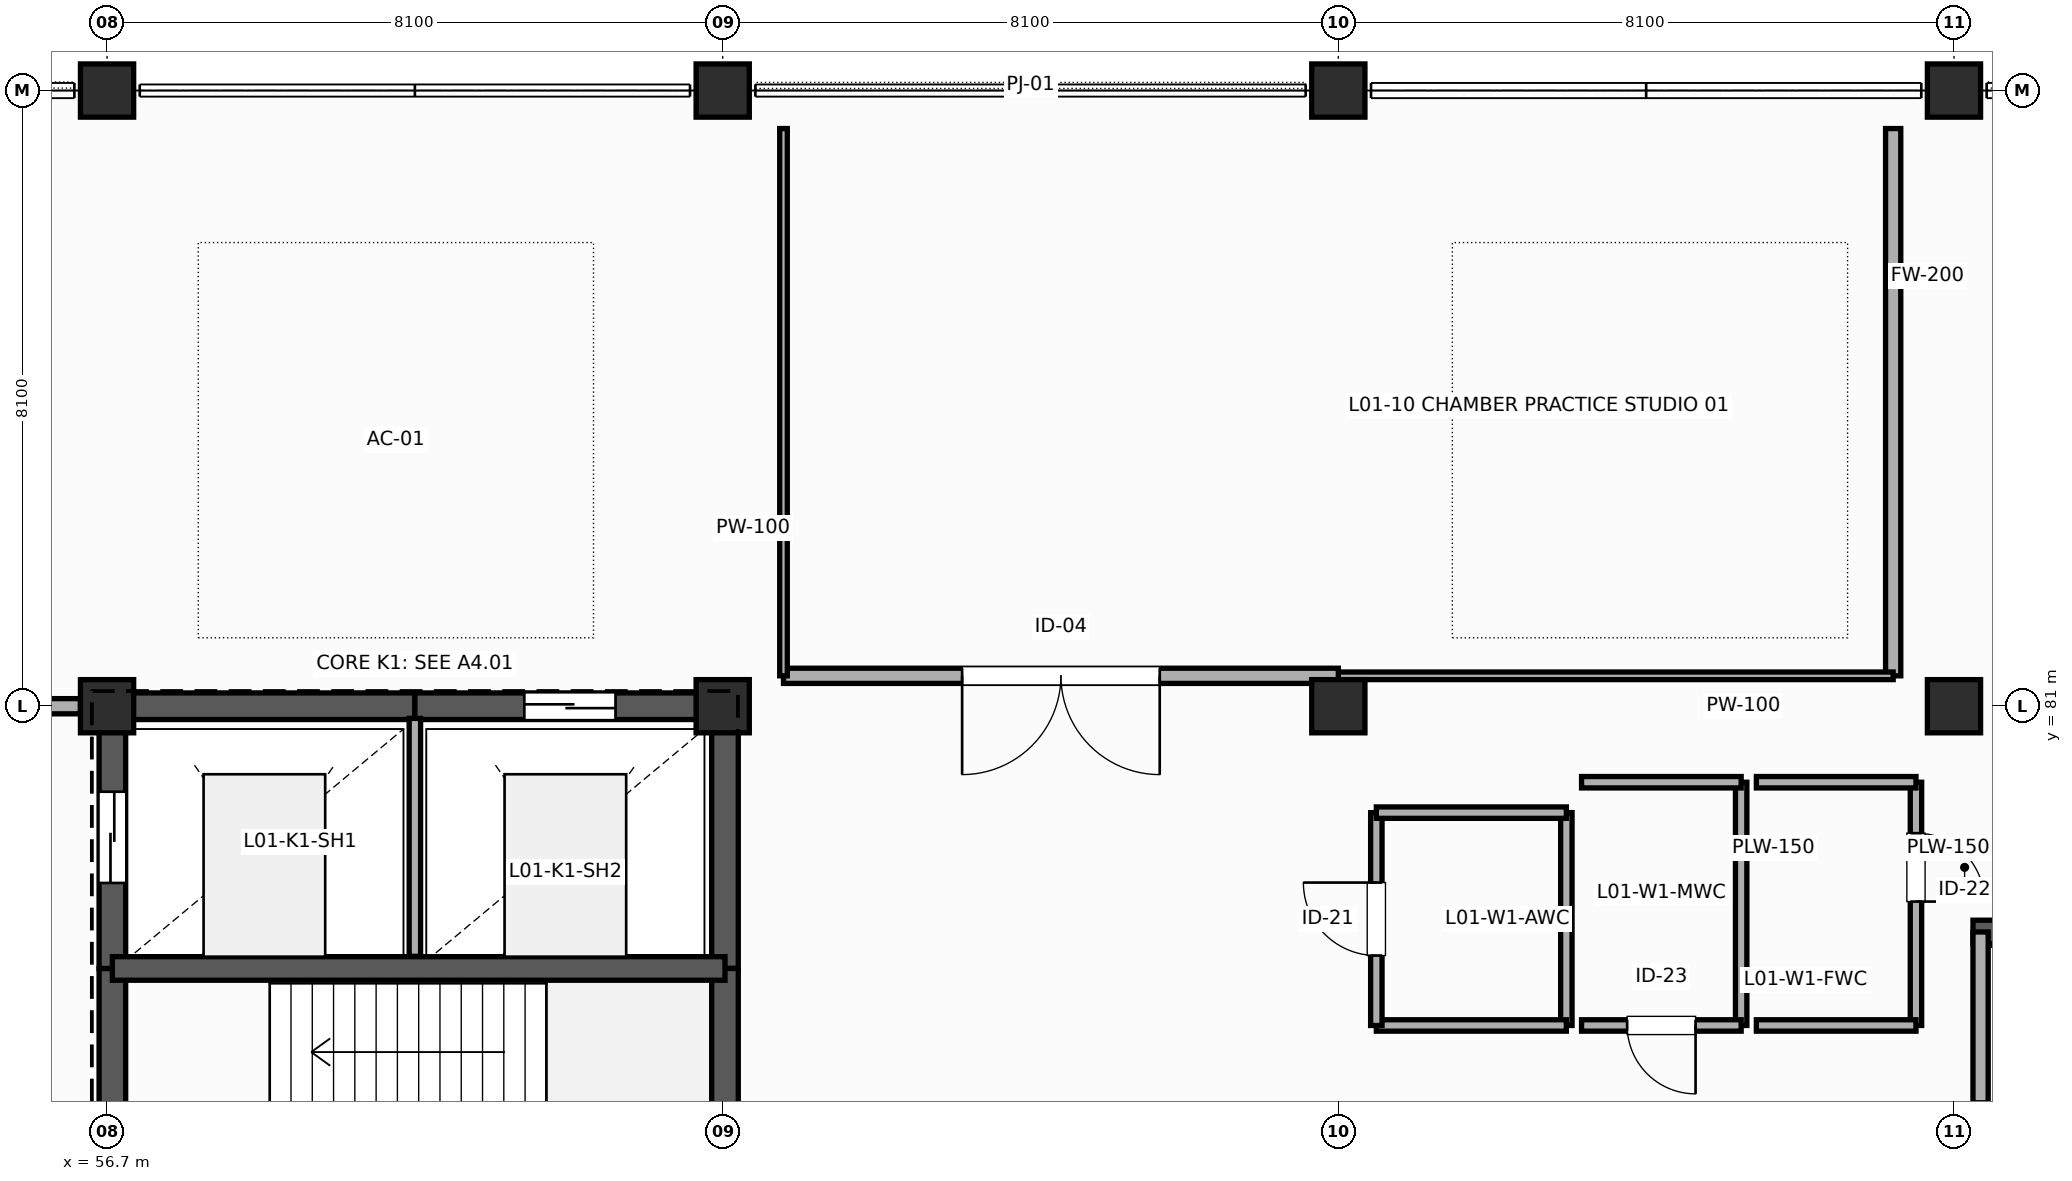
"""IFC4 building model, lengths in metres.
Left out: names, types, materials, properties, quantities, classifications, styles, units other than length and angle.
Written with IfcOpenShell. Run it as: python <this file> out.ifc"""

import sys

from ifc_helpers import new_model, si_unit, direction, frame, frame_2d, origin, origin_2d, place, context, subcontext, project, spatial, rectangle, extrude, element, fill, save


model = new_model("IFC4")
c1 = context("Model", 3, precision=1e-05, world=origin(), true_north=direction((0.0, 1.0)))
c2 = subcontext(c1, "Body", "Model", "MODEL_VIEW")
j1 = project(units=[si_unit("LENGTHUNIT", "METRE"), si_unit("PLANEANGLEUNIT", "RADIAN")], contexts=[c1])
p1 = place(None, origin())
s1 = spatial("IfcSite", under=j1, at=p1, CompositionType="ELEMENT")
p2 = place(p1, origin())
s2 = spatial("IfcBuilding", under=s1, at=p2, CompositionType="ELEMENT")
p3 = place(p2, frame((0.0, 0.0, 5.4)))
s3 = spatial("IfcBuildingStorey", under=s2, at=p3, CompositionType="ELEMENT", Elevation=5.4)
for number, where, z_axis, x_axis in (
    (1, (56.7, 81.0, 0.0), (0.0, 0.0, 1.0), (1.0, 0.0, 0.0)),
    (2, (56.7, 89.1, 0.0), (0.0, 0.0, 1.0), (1.0, 0.0, 0.0)),
    (3, (64.8, 81.0, 0.0), (0.0, 0.0, 1.0), (1.0, 0.0, 0.0)),
    (4, (64.8, 89.1, 0.0), (0.0, 0.0, 1.0), (1.0, 0.0, 0.0)),
    (5, (72.9, 81.0, 0.0), (0.0, 0.0, 1.0), (1.0, 0.0, 0.0)),
    (6, (72.9, 89.1, 0.0), (0.0, 0.0, 1.0), (1.0, 0.0, 0.0)),
    (7, (81.0, 81.0, 0.0), (0.0, 0.0, 1.0), (1.0, 0.0, 0.0)),
    (8, (81.0, 89.1, 0.0), (0.0, 0.0, 1.0), (1.0, 0.0, 0.0)),
):
    element("IfcColumn", number, at=place(p3, frame(where, z_axis=z_axis, x_axis=x_axis)), inside=s3, PredefinedType="COLUMN", context=c2, shape_type="SweptSolid", body=[
        extrude(rectangle(XDim=0.7, YDim=0.7, at=origin_2d()), origin(), (0.0, 0.0, 1.0), 4.8),
    ])
p4 = place(p3, frame((56.77, 73.13, 0.0), z_axis=(0.0, 0.0, 1.0), x_axis=(0.0, 1.0, 0.0)))
e9 = element("IfcWall", 9, at=p4, inside=s3, PredefinedType="SHEAR", context=c2, shape_type="SweptSolid", body=[
    extrude(rectangle(XDim=4.42, YDim=0.35, at=frame_2d((2.21, 0.0))), origin(), (0.0, 0.0, 1.0), 4.8),
])
p5 = place(p4, frame((1.35, 0.0, 0.0)))
e10 = element("IfcOpeningElement", 10, at=p5, cuts=e9, PredefinedType="OPENING", context=c2, shape_type="SweptSolid", body=[
    extrude(rectangle(XDim=1.2, YDim=2.25, at=frame_2d((0.6, 1.125))), frame((0.0, 0.185, 0.0), z_axis=(0.0, -1.0, 0.0), x_axis=(1.0, 0.0, 0.0)), (0.0, 0.0, 1.0), 0.37),
])
p6 = place(p3, frame((56.77, 77.55, 0.0), z_axis=(0.0, 0.0, 1.0), x_axis=(0.0, 1.0, 0.0)))
e11 = element("IfcWall", 11, at=p6, inside=s3, PredefinedType="SHEAR", context=c2, shape_type="SweptSolid", body=[
    extrude(rectangle(XDim=3.45, YDim=0.35, at=frame_2d((1.725, 0.0))), origin(), (0.0, 0.0, 1.0), 4.8),
])
p7 = place(p6, frame((1.125, 0.0, 0.0)))
e12 = element("IfcOpeningElement", 12, at=p7, cuts=e11, PredefinedType="OPENING", context=c2, shape_type="SweptSolid", body=[
    extrude(rectangle(XDim=1.2, YDim=2.2, at=frame_2d((0.6, 1.1))), frame((0.0, 0.185, 0.0), z_axis=(0.0, -1.0, 0.0), x_axis=(1.0, 0.0, 0.0)), (0.0, 0.0, 1.0), 0.37),
])
p8 = place(p3, frame((56.77, 81.0, 0.0), z_axis=(0.0, 0.0, 1.0), x_axis=(1.0, 0.0, 0.0)))
e13 = element("IfcWall", 13, at=p8, inside=s3, PredefinedType="SHEAR", context=c2, shape_type="SweptSolid", body=[
    extrude(rectangle(XDim=3.98, YDim=0.35, at=frame_2d((1.99, 0.0))), origin(), (0.0, 0.0, 1.0), 4.8),
])
p9 = place(p3, frame((60.75, 81.0, 0.0), z_axis=(0.0, 0.0, 1.0), x_axis=(1.0, 0.0, 0.0)))
e14 = element("IfcWall", 14, at=p9, inside=s3, PredefinedType="SHEAR", context=c2, shape_type="SweptSolid", body=[
    extrude(rectangle(XDim=4.08, YDim=0.35, at=frame_2d((2.04, 0.0))), origin(), (0.0, 0.0, 1.0), 4.8),
])
p10 = place(p9, frame((1.44, 0.0, 0.0)))
e15 = element("IfcOpeningElement", 15, at=p10, cuts=e14, PredefinedType="OPENING", context=c2, shape_type="SweptSolid", body=[
    extrude(rectangle(XDim=1.2, YDim=2.2, at=frame_2d((0.6, 1.1))), frame((0.0, 0.185, 0.0), z_axis=(0.0, -1.0, 0.0), x_axis=(1.0, 0.0, 0.0)), (0.0, 0.0, 1.0), 0.37),
])
p11 = place(p3, frame((64.83, 81.0, 0.0), z_axis=(0.0, 0.0, 1.0), x_axis=(0.0, -1.0, 0.0)))
e16 = element("IfcWall", 16, at=p11, inside=s3, PredefinedType="SHEAR", context=c2, shape_type="SweptSolid", body=[
    extrude(rectangle(XDim=3.45, YDim=0.35, at=frame_2d((1.725, 0.0))), origin(), (0.0, 0.0, 1.0), 4.8),
])
p12 = place(p3, frame((64.83, 77.55, 0.0), z_axis=(0.0, 0.0, 1.0), x_axis=(0.0, -1.0, 0.0)))
e17 = element("IfcWall", 17, at=p12, inside=s3, PredefinedType="SHEAR", context=c2, shape_type="SweptSolid", body=[
    extrude(rectangle(XDim=4.42, YDim=0.35, at=frame_2d((2.21, 0.0))), origin(), (0.0, 0.0, 1.0), 4.8),
])
p13 = place(p3, frame((56.77, 77.55, 0.0), z_axis=(0.0, 0.0, 1.0), x_axis=(1.0, 0.0, 0.0)))
e18 = element("IfcWall", 18, at=p13, inside=s3, PredefinedType="SHEAR", context=c2, shape_type="SweptSolid", body=[
    extrude(rectangle(XDim=8.06, YDim=0.31, at=frame_2d((4.03, 0.0))), origin(), (0.0, 0.0, 1.0), 4.8),
])
p14 = place(p3, frame((60.75, 77.71, 0.0), z_axis=(0.0, 0.0, 1.0), x_axis=(0.0, 1.0, 0.0)))
e19 = element("IfcWall", 19, at=p14, inside=s3, PredefinedType="PLUMBINGWALL", context=c2, shape_type="SweptSolid", body=[
    extrude(rectangle(XDim=3.13, YDim=0.15, at=frame_2d((1.565, 0.0))), origin(), (0.0, 0.0, 1.0), 4.45),
])
p15 = place(p3, frame((51.3, 81.0, 0.0), z_axis=(0.0, 0.0, 1.0), x_axis=(1.0, 0.0, 0.0)))
e20 = element("IfcWall", 20, at=p15, inside=s3, PredefinedType="PARTITIONING", context=c2, shape_type="SweptSolid", body=[
    extrude(rectangle(XDim=5.05, YDim=0.2, at=frame_2d((2.525, 0.0))), origin(), (0.0, 0.0, 1.0), 4.021),
])
p16 = place(p3, frame((89.795, 78.03, 0.0), z_axis=(0.0, 0.0, 1.0), x_axis=(-1.0, 0.0, 0.0)))
e21 = element("IfcWall", 21, at=p16, inside=s3, PredefinedType="SHEAR", context=c2, shape_type="SweptSolid", body=[
    extrude(rectangle(XDim=8.545, YDim=0.31, at=frame_2d((4.272, 0.0))), origin(), (0.0, 0.0, 1.0), 4.8),
])
p17 = place(p3, frame((81.35, 73.35, 0.0), z_axis=(0.0, 0.0, 1.0), x_axis=(0.0, 1.0, 0.0)))
e22 = element("IfcWall", 22, at=p17, inside=s3, PredefinedType="PARTITIONING", context=c2, shape_type="SweptSolid", body=[
    extrude(rectangle(XDim=4.68, YDim=0.2, at=frame_2d((2.34, 0.0))), origin(), (0.0, 0.0, 1.0), 4.45),
])
p18 = place(p17, frame((1.25, 0.0, 0.0)))
e23 = element("IfcOpeningElement", 23, at=p18, cuts=e22, PredefinedType="OPENING", context=c2, shape_type="SweptSolid", body=[
    extrude(rectangle(XDim=1.2, YDim=2.25, at=frame_2d((0.6, 1.125))), frame((0.0, 0.11, 0.0), z_axis=(0.0, -1.0, 0.0), x_axis=(1.0, 0.0, 0.0)), (0.0, 0.0, 1.0), 0.22),
])
p19 = place(p3, frame((75.9, 79.6, 0.0), z_axis=(0.0, 0.0, 1.0), x_axis=(0.0, -1.0, 0.0)))
e24 = element("IfcWall", 24, at=p19, inside=s3, PredefinedType="PLUMBINGWALL", context=c2, shape_type="SweptSolid", body=[
    extrude(rectangle(XDim=2.8, YDim=0.15, at=frame_2d((1.4, 0.0))), origin(), (0.0, 0.0, 1.0), 4.52),
])
p20 = place(p3, frame((75.9, 76.8, 0.0), z_axis=(0.0, 0.0, 1.0), x_axis=(-1.0, 0.0, 0.0)))
e25 = element("IfcWall", 25, at=p20, inside=s3, PredefinedType="PLUMBINGWALL", context=c2, shape_type="SweptSolid", body=[
    extrude(rectangle(XDim=2.5, YDim=0.15, at=frame_2d((1.25, 0.0))), origin(), (0.0, 0.0, 1.0), 4.52),
])
p21 = place(p3, frame((73.4, 76.8, 0.0), z_axis=(0.0, 0.0, 1.0), x_axis=(0.0, 1.0, 0.0)))
e26 = element("IfcWall", 26, at=p21, inside=s3, PredefinedType="PLUMBINGWALL", context=c2, shape_type="SweptSolid", body=[
    extrude(rectangle(XDim=2.8, YDim=0.15, at=frame_2d((1.4, 0.0))), origin(), (0.0, 0.0, 1.0), 4.52),
])
p22 = place(p21, frame((0.92, 0.0, 0.0)))
e27 = element("IfcOpeningElement", 27, at=p22, cuts=e26, PredefinedType="OPENING", context=c2, shape_type="SweptSolid", body=[
    extrude(rectangle(XDim=0.96, YDim=2.16, at=frame_2d((0.48, 1.08))), frame((0.0, 0.085, 0.0), z_axis=(0.0, -1.0, 0.0), x_axis=(1.0, 0.0, 0.0)), (0.0, 0.0, 1.0), 0.17),
])
p23 = place(p3, frame((73.4, 79.6, 0.0), z_axis=(0.0, 0.0, 1.0), x_axis=(1.0, 0.0, 0.0)))
e28 = element("IfcWall", 28, at=p23, inside=s3, PredefinedType="PLUMBINGWALL", context=c2, shape_type="SweptSolid", body=[
    extrude(rectangle(XDim=2.5, YDim=0.15, at=frame_2d((1.25, 0.0))), origin(), (0.0, 0.0, 1.0), 4.52),
])
p24 = place(p3, frame((78.2, 80.0, 0.0), z_axis=(0.0, 0.0, 1.0), x_axis=(0.0, -1.0, 0.0)))
e29 = element("IfcWall", 29, at=p24, inside=s3, PredefinedType="PLUMBINGWALL", context=c2, shape_type="SweptSolid", body=[
    extrude(rectangle(XDim=3.2, YDim=0.15, at=frame_2d((1.6, 0.0))), origin(), (0.0, 0.0, 1.0), 4.52),
])
p25 = place(p3, frame((78.2, 76.8, 0.0), z_axis=(0.0, 0.0, 1.0), x_axis=(-1.0, 0.0, 0.0)))
e30 = element("IfcWall", 30, at=p25, inside=s3, PredefinedType="PLUMBINGWALL", context=c2, shape_type="SweptSolid", body=[
    extrude(rectangle(XDim=2.1, YDim=0.15, at=frame_2d((1.05, 0.0))), origin(), (0.0, 0.0, 1.0), 4.52),
])
p26 = place(p25, frame((0.6, 0.0, 0.0)))
e31 = element("IfcOpeningElement", 31, at=p26, cuts=e30, PredefinedType="OPENING", context=c2, shape_type="SweptSolid", body=[
    extrude(rectangle(XDim=0.9, YDim=2.2, at=frame_2d((0.45, 1.1))), frame((0.0, 0.085, 0.0), z_axis=(0.0, -1.0, 0.0), x_axis=(1.0, 0.0, 0.0)), (0.0, 0.0, 1.0), 0.17),
])
p27 = place(p3, frame((76.1, 80.0, 0.0), z_axis=(0.0, 0.0, 1.0), x_axis=(1.0, 0.0, 0.0)))
e32 = element("IfcWall", 32, at=p27, inside=s3, PredefinedType="PLUMBINGWALL", context=c2, shape_type="SweptSolid", body=[
    extrude(rectangle(XDim=2.1, YDim=0.15, at=frame_2d((1.05, 0.0))), origin(), (0.0, 0.0, 1.0), 4.52),
])
p28 = place(p3, frame((80.5, 80.0, 0.0), z_axis=(0.0, 0.0, 1.0), x_axis=(0.0, -1.0, 0.0)))
e33 = element("IfcWall", 33, at=p28, inside=s3, PredefinedType="PLUMBINGWALL", context=c2, shape_type="SweptSolid", body=[
    extrude(rectangle(XDim=3.2, YDim=0.15, at=frame_2d((1.6, 0.0))), origin(), (0.0, 0.0, 1.0), 4.52),
])
p29 = place(p28, frame((0.67, 0.0, 0.0)))
e34 = element("IfcOpeningElement", 34, at=p29, cuts=e33, PredefinedType="OPENING", context=c2, shape_type="SweptSolid", body=[
    extrude(rectangle(XDim=0.9, YDim=2.1, at=frame_2d((0.45, 1.05))), frame((0.0, 0.085, 0.0), z_axis=(0.0, -1.0, 0.0), x_axis=(1.0, 0.0, 0.0)), (0.0, 0.0, 1.0), 0.17),
])
for number, where, z_axis, x_axis in (
    (35, (80.5, 76.8, 0.0), (0.0, 0.0, 1.0), (-1.0, 0.0, 0.0)),
    (36, (78.4, 80.0, 0.0), (0.0, 0.0, 1.0), (1.0, 0.0, 0.0)),
):
    element("IfcWall", number, at=place(p3, frame(where, z_axis=z_axis, x_axis=x_axis)), inside=s3, PredefinedType="PLUMBINGWALL", context=c2, shape_type="SweptSolid", body=[
        extrude(rectangle(XDim=2.1, YDim=0.15, at=frame_2d((1.05, 0.0))), origin(), (0.0, 0.0, 1.0), 4.52),
    ])
p30 = place(p3, frame((80.2, 88.6, 0.0), z_axis=(0.0, 0.0, 1.0), x_axis=(0.0, -1.0, 0.0)))
e37 = element("IfcWall", 37, at=p30, inside=s3, PredefinedType="PARTITIONING", context=c2, shape_type="SweptSolid", body=[
    extrude(rectangle(XDim=7.2, YDim=0.2, at=frame_2d((3.6, 0.0))), origin(), (0.0, 0.0, 1.0), 4.52),
])
p31 = place(p3, frame((80.2, 81.4, 0.0), z_axis=(0.0, 0.0, 1.0), x_axis=(-1.0, 0.0, 0.0)))
e38 = element("IfcWall", 38, at=p31, inside=s3, PredefinedType="PARTITIONING", context=c2, shape_type="SweptSolid", body=[
    extrude(rectangle(XDim=7.3, YDim=0.1, at=frame_2d((3.65, 0.0))), origin(), (0.0, 0.0, 1.0), 3.654),
])
p32 = place(p3, frame((72.9, 81.4, 0.0), z_axis=(0.0, 0.0, 1.0), x_axis=(-1.0, 0.0, 0.0)))
e39 = element("IfcWall", 39, at=p32, inside=s3, PredefinedType="PARTITIONING", context=c2, shape_type="SweptSolid", body=[
    extrude(rectangle(XDim=7.3, YDim=0.2, at=frame_2d((3.65, 0.0))), origin(), (0.0, 0.0, 1.0), 3.754),
])
p33 = place(p32, frame((2.35, 0.0, 0.0)))
e40 = element("IfcOpeningElement", 40, at=p33, cuts=e39, PredefinedType="OPENING", context=c2, shape_type="SweptSolid", body=[
    extrude(rectangle(XDim=2.6, YDim=3.0, at=frame_2d((1.3, 1.5))), frame((0.0, 0.11, 0.0), z_axis=(0.0, -1.0, 0.0), x_axis=(1.0, 0.0, 0.0)), (0.0, 0.0, 1.0), 0.22),
])
p34 = place(p3, frame((65.6, 81.4, 0.0), z_axis=(0.0, 0.0, 1.0), x_axis=(0.0, 1.0, 0.0)))
e41 = element("IfcWall", 41, at=p34, inside=s3, PredefinedType="PARTITIONING", context=c2, shape_type="SweptSolid", body=[
    extrude(rectangle(XDim=7.2, YDim=0.1, at=frame_2d((3.6, 0.0))), origin(), (0.0, 0.0, 1.0), 4.52),
])
p35 = place(p7, origin())
e42 = element("IfcDoor", 42, at=p35, inside=s3, OperationType="SLIDING_TO_LEFT", PredefinedType="DOOR", context=c2, shape_type="SweptSolid", body=[
    extrude(rectangle(XDim=1.2, YDim=2.2, at=frame_2d((0.6, 1.1))), frame((0.0, 0.025, 0.0), z_axis=(0.0, -1.0, 0.0), x_axis=(1.0, 0.0, 0.0)), (0.0, 0.0, 1.0), 0.05),
])
fill(e12, e42)
p36 = place(p10, origin())
e43 = element("IfcDoor", 43, at=p36, inside=s3, OperationType="SLIDING_TO_LEFT", PredefinedType="DOOR", context=c2, shape_type="SweptSolid", body=[
    extrude(rectangle(XDim=1.2, YDim=2.2, at=frame_2d((0.6, 1.1))), frame((0.0, 0.025, 0.0), z_axis=(0.0, -1.0, 0.0), x_axis=(1.0, 0.0, 0.0)), (0.0, 0.0, 1.0), 0.05),
])
fill(e15, e43)
p37 = place(p18, origin())
e44 = element("IfcDoor", 44, at=p37, inside=s3, OperationType="SINGLE_SWING_LEFT", PredefinedType="DOOR", context=c2, shape_type="SweptSolid", body=[
    extrude(rectangle(XDim=1.2, YDim=2.25, at=frame_2d((0.6, 1.125))), frame((0.0, 0.025, 0.0), z_axis=(0.0, -1.0, 0.0), x_axis=(1.0, 0.0, 0.0)), (0.0, 0.0, 1.0), 0.05),
])
fill(e23, e44)
p38 = place(p22, origin())
e45 = element("IfcDoor", 45, at=p38, inside=s3, OperationType="SINGLE_SWING_RIGHT", PredefinedType="DOOR", context=c2, shape_type="SweptSolid", body=[
    extrude(rectangle(XDim=0.96, YDim=2.16, at=frame_2d((0.48, 1.08))), frame((0.0, 0.025, 0.0), z_axis=(0.0, -1.0, 0.0), x_axis=(1.0, 0.0, 0.0)), (0.0, 0.0, 1.0), 0.05),
])
fill(e27, e45)
p39 = place(p26, origin())
e46 = element("IfcDoor", 46, at=p39, inside=s3, OperationType="SINGLE_SWING_LEFT", PredefinedType="DOOR", context=c2, shape_type="SweptSolid", body=[
    extrude(rectangle(XDim=0.9, YDim=2.2, at=frame_2d((0.45, 1.1))), frame((0.0, 0.025, 0.0), z_axis=(0.0, -1.0, 0.0), x_axis=(1.0, 0.0, 0.0)), (0.0, 0.0, 1.0), 0.05),
])
fill(e31, e46)
p40 = place(p29, origin())
e47 = element("IfcDoor", 47, at=p40, inside=s3, OperationType="SINGLE_SWING_RIGHT", PredefinedType="DOOR", context=c2, shape_type="SweptSolid", body=[
    extrude(rectangle(XDim=0.9, YDim=2.1, at=frame_2d((0.45, 1.05))), frame((0.0, 0.025, 0.0), z_axis=(0.0, -1.0, 0.0), x_axis=(1.0, 0.0, 0.0)), (0.0, 0.0, 1.0), 0.05),
])
fill(e34, e47)
p41 = place(p33, origin())
e48 = element("IfcDoor", 48, at=p41, inside=s3, OperationType="DOUBLE_DOOR_SINGLE_SWING", PredefinedType="DOOR", context=c2, shape_type="SweptSolid", body=[
    extrude(rectangle(XDim=2.6, YDim=3.0, at=frame_2d((1.3, 1.5))), frame((0.0, 0.025, 0.0), z_axis=(0.0, -1.0, 0.0), x_axis=(1.0, 0.0, 0.0)), (0.0, 0.0, 1.0), 0.05),
])
fill(e40, e48)
save(model, sys.argv[1])
